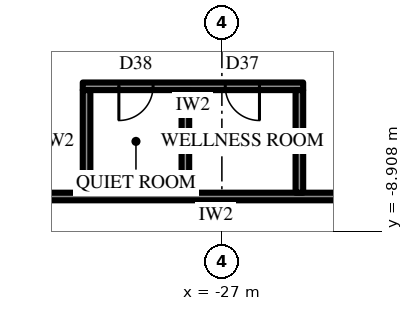
"""IFC4 building model, lengths in metres.
Left out: names, types, materials, properties, quantities, classifications, styles, units other than length and angle.
Written with IfcOpenShell. Run it as: python <this file> out.ifc"""

import sys

from ifc_helpers import new_model, si_unit, direction, frame, frame_2d, origin, place, context, subcontext, project, spatial, rectangle, extrude, element, fill, save


model = new_model("IFC4")
c1 = context("Model", 3, precision=1e-05, world=origin(), true_north=direction((0.0, 1.0)))
c2 = subcontext(c1, "Body", "Model", "MODEL_VIEW")
j1 = project(units=[si_unit("LENGTHUNIT", "METRE"), si_unit("PLANEANGLEUNIT", "RADIAN")], contexts=[c1])
p1 = place(None, origin())
s1 = spatial("IfcSite", under=j1, at=p1, CompositionType="ELEMENT")
p2 = place(p1, origin())
s2 = spatial("IfcBuilding", under=s1, at=p2, CompositionType="ELEMENT")
p3 = place(p2, frame((0.0, 0.0, 103.3)))
s3 = spatial("IfcBuildingStorey", under=s2, at=p3, CompositionType="ELEMENT", Elevation=103.3)
p4 = place(p3, frame((-37.398, -2.925, 0.0), z_axis=(0.0, 0.0, 1.0), x_axis=(0.499999163675, -0.866025886636, 0.0)))
e1 = element("IfcWall", 1, at=p4, inside=s3, PredefinedType="SOLIDWALL", context=c2, shape_type="SweptSolid", body=[
    extrude(rectangle(XDim=32.332, YDim=0.3, at=frame_2d((16.166, 0.0))), origin(), (0.0, 0.0, 1.0), 2.2),
])
p5 = place(p4, frame((1.319, 0.0, 0.6)))
e2 = element("IfcOpeningElement", 2, at=p5, cuts=e1, PredefinedType="OPENING", context=c2, shape_type="SweptSolid", body=[
    extrude(rectangle(XDim=2.75, YDim=1.35, at=frame_2d((1.375, 0.675))), frame((0.0, 0.16, 0.0), z_axis=(0.0, -1.0, 0.0), x_axis=(1.0, 0.0, 0.0)), (0.0, 0.0, 1.0), 0.32),
])
p6 = place(p4, frame((6.708, 0.0, 0.6)))
e3 = element("IfcOpeningElement", 3, at=p6, cuts=e1, PredefinedType="OPENING", context=c2, shape_type="SweptSolid", body=[
    extrude(rectangle(XDim=2.75, YDim=1.35, at=frame_2d((1.375, 0.675))), frame((0.0, 0.16, 0.0), z_axis=(0.0, -1.0, 0.0), x_axis=(1.0, 0.0, 0.0)), (0.0, 0.0, 1.0), 0.32),
])
p7 = place(p4, frame((12.872, 0.0, 0.0)))
e4 = element("IfcOpeningElement", 4, at=p7, cuts=e1, PredefinedType="OPENING", context=c2, shape_type="SweptSolid", body=[
    extrude(rectangle(XDim=1.2, YDim=2.1, at=frame_2d((0.6, 1.05))), frame((0.0, 0.16, 0.0), z_axis=(0.0, -1.0, 0.0), x_axis=(1.0, 0.0, 0.0)), (0.0, 0.0, 1.0), 0.32),
])
p8 = place(p4, frame((17.485, 0.0, 0.6)))
e5 = element("IfcOpeningElement", 5, at=p8, cuts=e1, PredefinedType="OPENING", context=c2, shape_type="SweptSolid", body=[
    extrude(rectangle(XDim=2.75, YDim=1.35, at=frame_2d((1.375, 0.675))), frame((0.0, 0.16, 0.0), z_axis=(0.0, -1.0, 0.0), x_axis=(1.0, 0.0, 0.0)), (0.0, 0.0, 1.0), 0.32),
])
p9 = place(p4, frame((22.874, 0.0, 0.6)))
e6 = element("IfcOpeningElement", 6, at=p9, cuts=e1, PredefinedType="OPENING", context=c2, shape_type="SweptSolid", body=[
    extrude(rectangle(XDim=2.75, YDim=1.35, at=frame_2d((1.375, 0.675))), frame((0.0, 0.16, 0.0), z_axis=(0.0, -1.0, 0.0), x_axis=(1.0, 0.0, 0.0)), (0.0, 0.0, 1.0), 0.32),
])
p10 = place(p4, frame((28.262, 0.0, 0.6)))
e7 = element("IfcOpeningElement", 7, at=p10, cuts=e1, PredefinedType="OPENING", context=c2, shape_type="SweptSolid", body=[
    extrude(rectangle(XDim=2.75, YDim=1.35, at=frame_2d((1.375, 0.675))), frame((0.0, 0.16, 0.0), z_axis=(0.0, -1.0, 0.0), x_axis=(1.0, 0.0, 0.0)), (0.0, 0.0, 1.0), 0.32),
])
p11 = place(p3, frame((-21.1, -8.0, 0.0), z_axis=(0.0, 0.0, 1.0), x_axis=(-1.0, 0.0, 0.0)))
e8 = element("IfcWall", 8, at=p11, inside=s3, PredefinedType="PARTITIONING", context=c2, shape_type="SweptSolid", body=[
    extrude(rectangle(XDim=12.111, YDim=0.2, at=frame_2d((6.055, 0.0))), origin(), (0.0, 0.0, 1.0), 3.9),
])
p12 = place(p11, frame((0.711, 0.0, 0.0)))
e9 = element("IfcOpeningElement", 9, at=p12, cuts=e8, PredefinedType="OPENING", context=c2, shape_type="SweptSolid", body=[
    extrude(rectangle(XDim=1.0, YDim=2.2, at=frame_2d((0.5, 1.1))), frame((0.0, 0.11, 0.0), z_axis=(0.0, -1.0, 0.0), x_axis=(1.0, 0.0, 0.0)), (0.0, 0.0, 1.0), 0.22),
])
p13 = place(p3, frame((-24.861, -5.1, 0.0), z_axis=(0.0, 0.0, 1.0), x_axis=(-1.0, 0.0, 0.0)))
e10 = element("IfcWall", 10, at=p13, inside=s3, PredefinedType="PARTITIONING", context=c2, shape_type="SweptSolid", body=[
    extrude(rectangle(XDim=5.8, YDim=0.2, at=frame_2d((2.9, 0.0))), origin(), (0.0, 0.0, 1.0), 3.9),
])
p14 = place(p13, frame((1.15, 0.0, 0.0)))
e11 = element("IfcOpeningElement", 11, at=p14, cuts=e10, PredefinedType="OPENING", context=c2, shape_type="SweptSolid", body=[
    extrude(rectangle(XDim=0.9, YDim=2.2, at=frame_2d((0.45, 1.1))), frame((0.0, 0.11, 0.0), z_axis=(0.0, -1.0, 0.0), x_axis=(1.0, 0.0, 0.0)), (0.0, 0.0, 1.0), 0.22),
])
p15 = place(p13, frame((3.95, 0.0, 0.0)))
e12 = element("IfcOpeningElement", 12, at=p15, cuts=e10, PredefinedType="OPENING", context=c2, shape_type="SweptSolid", body=[
    extrude(rectangle(XDim=0.9, YDim=2.2, at=frame_2d((0.45, 1.1))), frame((0.0, 0.11, 0.0), z_axis=(0.0, -1.0, 0.0), x_axis=(1.0, 0.0, 0.0)), (0.0, 0.0, 1.0), 0.22),
])
for number, where, z_axis, x_axis in (
    (13, (-24.961, -7.9, 0.0), (0.0, 0.0, 1.0), (0.0, 1.0, 0.0)),
    (14, (-27.961, -7.9, 0.0), (0.0, 0.0, 1.0), (0.0, 1.0, 0.0)),
    (15, (-30.561, -7.9, 0.0), (0.0, 0.0, 1.0), (0.0, 1.0, 0.0)),
):
    element("IfcWall", number, at=place(p3, frame(where, z_axis=z_axis, x_axis=x_axis)), inside=s3, PredefinedType="PARTITIONING", context=c2, shape_type="SweptSolid", body=[
        extrude(rectangle(XDim=2.7, YDim=0.2, at=frame_2d((1.35, 0.0))), origin(), (0.0, 0.0, 1.0), 3.9),
    ])
p16 = place(p14, origin())
e16 = element("IfcDoor", 16, at=p16, inside=s3, OperationType="SINGLE_SWING_RIGHT", PredefinedType="DOOR", context=c2, shape_type="SweptSolid", body=[
    extrude(rectangle(XDim=0.9, YDim=2.2, at=frame_2d((0.45, 1.1))), frame((0.0, 0.025, 0.0), z_axis=(0.0, -1.0, 0.0), x_axis=(1.0, 0.0, 0.0)), (0.0, 0.0, 1.0), 0.05),
])
fill(e11, e16)
p17 = place(p15, origin())
e17 = element("IfcDoor", 17, at=p17, inside=s3, OperationType="SINGLE_SWING_LEFT", PredefinedType="DOOR", context=c2, shape_type="SweptSolid", body=[
    extrude(rectangle(XDim=0.9, YDim=2.2, at=frame_2d((0.45, 1.1))), frame((0.0, 0.025, 0.0), z_axis=(0.0, -1.0, 0.0), x_axis=(1.0, 0.0, 0.0)), (0.0, 0.0, 1.0), 0.05),
])
fill(e12, e17)
save(model, sys.argv[1])
